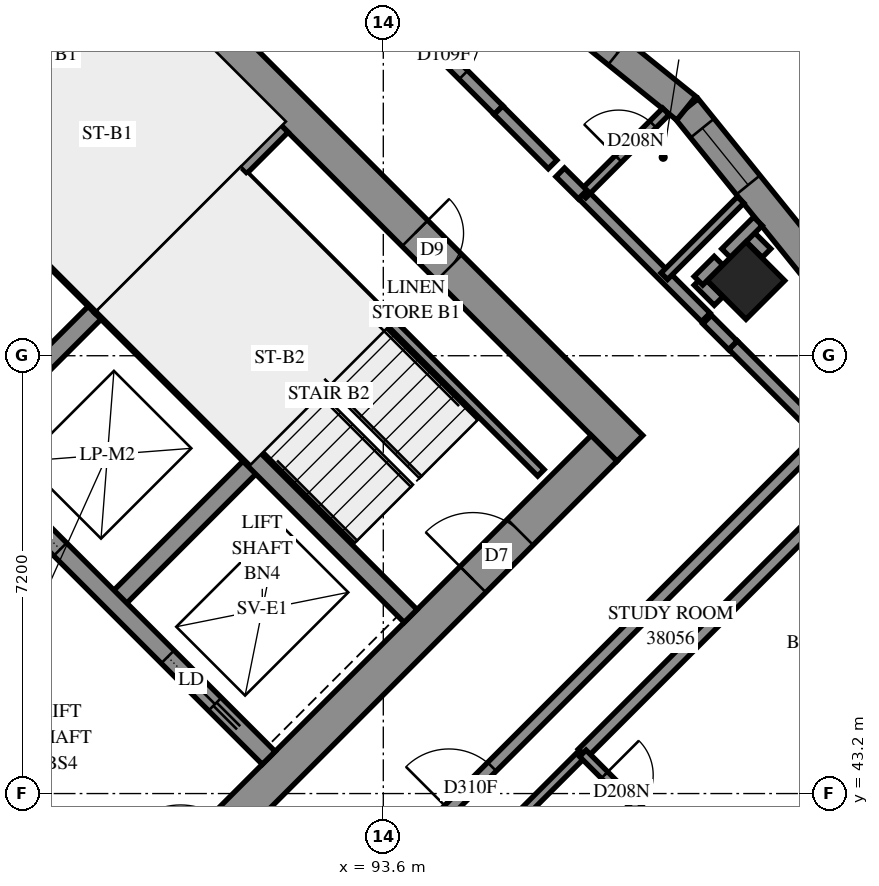
"""IFC4 building model, lengths in metres.
Left out: names, types, materials, properties, quantities, classifications, styles, units other than length and angle.
Written with IfcOpenShell. Run it as: python <this file> out.ifc"""

import sys

from ifc_helpers import new_model, si_unit, direction, frame, frame_2d, origin, origin_2d, place, context, subcontext, project, spatial, polyline, rectangle, outline, extrude, element, fill, save


model = new_model("IFC4")
c1 = context("Model", 3, precision=1e-05, world=origin(), true_north=direction((0.0, 1.0)))
c2 = subcontext(c1, "Body", "Model", "MODEL_VIEW")
j1 = project(units=[si_unit("LENGTHUNIT", "METRE"), si_unit("PLANEANGLEUNIT", "RADIAN")], contexts=[c1])
p1 = place(None, origin())
s1 = spatial("IfcSite", under=j1, at=p1, CompositionType="ELEMENT")
p2 = place(p1, origin())
s2 = spatial("IfcBuilding", under=s1, at=p2, CompositionType="ELEMENT")
p3 = place(p2, frame((0.0, 0.0, 142.2)))
s3 = spatial("IfcBuildingStorey", under=s2, at=p3, CompositionType="ELEMENT", Elevation=142.2)
p4 = place(p3, frame((99.565, 51.635, 0.0), z_axis=(0.0, 0.0, 1.0), x_axis=(0.7071067812, -0.7071067812, 0.0)))
e1 = element("IfcColumn", 1, at=p4, inside=s3, PredefinedType="COLUMN", context=c2, shape_type="SweptSolid", body=[
    extrude(rectangle(XDim=0.9, YDim=0.9, at=origin_2d()), origin(), (0.0, 0.0, 1.0), 3.1),
])
p5 = place(p3, frame((86.625, 59.908, -0.3), z_axis=(0.0, 0.0, 1.0), x_axis=(0.7071067812, -0.7071067812, 0.0)))
e2 = element("IfcWall", 2, at=p5, inside=s3, PredefinedType="SHEAR", context=c2, shape_type="SweptSolid", body=[
    extrude(rectangle(XDim=15.6, YDim=0.6, at=frame_2d((7.8, 0.0))), origin(), (0.0, 0.0, 1.0), 2.7),
])
p6 = place(p5, frame((10.6, 0.0, 0.3)))
e3 = element("IfcOpeningElement", 3, at=p6, cuts=e2, PredefinedType="OPENING", context=c2, shape_type="SweptSolid", body=[
    extrude(rectangle(XDim=0.8, YDim=2.1, at=frame_2d((0.4, 1.05))), frame((0.0, 0.31, 0.0), z_axis=(0.0, -1.0, 0.0), x_axis=(1.0, 0.0, 0.0)), (0.0, 0.0, 1.0), 0.62),
])
p7 = place(p3, frame((87.049, 38.695, -0.3), z_axis=(0.0, 0.0, 1.0), x_axis=(0.7071067812, 0.7071067812, 0.0)))
e4 = element("IfcWall", 4, at=p7, inside=s3, PredefinedType="SHEAR", context=c2, shape_type="SweptSolid", body=[
    extrude(rectangle(XDim=14.4, YDim=0.6, at=frame_2d((7.2, 0.0))), origin(), (0.0, 0.0, 1.0), 2.7),
])
p8 = place(p7, frame((4.55, 0.0, 0.3)))
e5 = element("IfcOpeningElement", 5, at=p8, cuts=e4, PredefinedType="OPENING", context=c2, shape_type="SweptSolid", body=[
    extrude(rectangle(XDim=1.1, YDim=2.1, at=frame_2d((0.55, 1.05))), frame((0.0, 0.31, 0.0), z_axis=(0.0, -1.0, 0.0), x_axis=(1.0, 0.0, 0.0)), (0.0, 0.0, 1.0), 0.62),
])
p9 = place(p7, frame((11.35, 0.0, 0.3)))
e6 = element("IfcOpeningElement", 6, at=p9, cuts=e4, PredefinedType="OPENING", context=c2, shape_type="SweptSolid", body=[
    extrude(rectangle(XDim=1.1, YDim=2.1, at=frame_2d((0.55, 1.05))), frame((0.0, 0.31, 0.0), z_axis=(0.0, -1.0, 0.0), x_axis=(1.0, 0.0, 0.0)), (0.0, 0.0, 1.0), 0.62),
])
for number, where, z_axis, x_axis in (
    (7, (86.625, 48.878, 0.0), (0.0, 0.0, 1.0), (0.707, 0.707, 0.0)),
    (8, (89.17, 46.332, 0.0), (0.0, 0.0, 1.0), (0.707, 0.707, 0.0)),
):
    element("IfcWall", number, at=place(p3, frame(where, z_axis=z_axis, x_axis=x_axis)), inside=s3, PredefinedType="SOLIDWALL", context=c2, shape_type="SweptSolid", body=[
        extrude(rectangle(XDim=3.3, YDim=0.3, at=frame_2d((1.65, 0.0))), origin(), (0.0, 0.0, 1.0), 3.1),
    ])
p10 = place(p3, frame((78.988, 51.423, 0.0), z_axis=(0.0, 0.0, 1.0), x_axis=(0.7071067812, -0.7071067812, 0.0)))
e9 = element("IfcWall", 9, at=p10, inside=s3, PredefinedType="SOLIDWALL", context=c2, shape_type="SweptSolid", body=[
    extrude(rectangle(XDim=14.4, YDim=0.3, at=frame_2d((7.2, 0.0))), origin(), (0.0, 0.0, 1.0), 3.1),
])
p11 = place(p10, frame((1.35, 0.0, 0.0)))
e10 = element("IfcOpeningElement", 10, at=p11, cuts=e9, PredefinedType="OPENING", context=c2, shape_type="SweptSolid", body=[
    extrude(rectangle(XDim=0.9, YDim=2.1, at=frame_2d((0.45, 1.05))), frame((0.0, 0.16, 0.0), z_axis=(0.0, -1.0, 0.0), x_axis=(1.0, 0.0, 0.0)), (0.0, 0.0, 1.0), 0.32),
])
p12 = place(p10, frame((4.95, 0.0, 0.0)))
e11 = element("IfcOpeningElement", 11, at=p12, cuts=e9, PredefinedType="OPENING", context=c2, shape_type="SweptSolid", body=[
    extrude(rectangle(XDim=0.9, YDim=2.1, at=frame_2d((0.45, 1.05))), frame((0.0, 0.16, 0.0), z_axis=(0.0, -1.0, 0.0), x_axis=(1.0, 0.0, 0.0)), (0.0, 0.0, 1.0), 0.32),
])
p13 = place(p10, frame((8.55, 0.0, 0.0)))
e12 = element("IfcOpeningElement", 12, at=p13, cuts=e9, PredefinedType="OPENING", context=c2, shape_type="SweptSolid", body=[
    extrude(rectangle(XDim=0.9, YDim=2.1, at=frame_2d((0.45, 1.05))), frame((0.0, 0.16, 0.0), z_axis=(0.0, -1.0, 0.0), x_axis=(1.0, 0.0, 0.0)), (0.0, 0.0, 1.0), 0.32),
])
p14 = place(p10, frame((12.05, 0.0, 0.0)))
e13 = element("IfcOpeningElement", 13, at=p14, cuts=e9, PredefinedType="OPENING", context=c2, shape_type="SweptSolid", body=[
    extrude(rectangle(XDim=1.1, YDim=2.1, at=frame_2d((0.55, 1.05))), frame((0.0, 0.16, 0.0), z_axis=(0.0, -1.0, 0.0), x_axis=(1.0, 0.0, 0.0)), (0.0, 0.0, 1.0), 0.32),
])
p15 = place(p3, frame((81.534, 53.969, 0.0), z_axis=(0.0, 0.0, 1.0), x_axis=(0.707103309, -0.7071102534, 0.0)))
e14 = element("IfcWall", 14, at=p15, inside=s3, PredefinedType="SOLIDWALL", context=c2, shape_type="SweptSolid", body=[
    extrude(rectangle(XDim=14.4, YDim=0.3, at=frame_2d((7.2, 0.0))), origin(), (0.0, 0.0, 1.0), 3.1),
])
p16 = place(p15, frame((1.25, 0.0, 0.0)))
e15 = element("IfcOpeningElement", 15, at=p16, cuts=e14, PredefinedType="OPENING", context=c2, shape_type="SweptSolid", body=[
    extrude(rectangle(XDim=1.1, YDim=2.1, at=frame_2d((0.55, 1.05))), frame((0.0, 0.16, 0.0), z_axis=(0.0, -1.0, 0.0), x_axis=(1.0, 0.0, 0.0)), (0.0, 0.0, 1.0), 0.32),
])
p17 = place(p15, frame((4.85, 0.0, 0.0)))
e16 = element("IfcOpeningElement", 16, at=p17, cuts=e14, PredefinedType="OPENING", context=c2, shape_type="SweptSolid", body=[
    extrude(rectangle(XDim=1.1, YDim=2.1, at=frame_2d((0.55, 1.05))), frame((0.0, 0.16, 0.0), z_axis=(0.0, -1.0, 0.0), x_axis=(1.0, 0.0, 0.0)), (0.0, 0.0, 1.0), 0.32),
])
p18 = place(p15, frame((8.45, 0.0, 0.0)))
e17 = element("IfcOpeningElement", 17, at=p18, cuts=e14, PredefinedType="OPENING", context=c2, shape_type="SweptSolid", body=[
    extrude(rectangle(XDim=1.1, YDim=2.1, at=frame_2d((0.55, 1.05))), frame((0.0, 0.16, 0.0), z_axis=(0.0, -1.0, 0.0), x_axis=(1.0, 0.0, 0.0)), (0.0, 0.0, 1.0), 0.32),
])
p19 = place(p15, frame((12.05, 0.0, 0.0)))
e18 = element("IfcOpeningElement", 18, at=p19, cuts=e14, PredefinedType="OPENING", context=c2, shape_type="SweptSolid", body=[
    extrude(rectangle(XDim=1.1, YDim=2.1, at=frame_2d((0.55, 1.05))), frame((0.0, 0.16, 0.0), z_axis=(0.0, -1.0, 0.0), x_axis=(1.0, 0.0, 0.0)), (0.0, 0.0, 1.0), 0.32),
])
for number, where, z_axis, x_axis in (
    (19, (83.867, 56.302, 0.0), (0.0, 0.0, 1.0), (0.707, -0.707, 0.0)),
    (20, (88.958, 51.211, 0.0), (0.0, 0.0, 1.0), (0.707, -0.707, 0.0)),
):
    element("IfcWall", number, at=place(p3, frame(where, z_axis=z_axis, x_axis=x_axis)), inside=s3, PredefinedType="SOLIDWALL", context=c2, shape_type="SweptSolid", body=[
        extrude(rectangle(XDim=7.2, YDim=0.3, at=frame_2d((3.6, 0.0))), origin(), (0.0, 0.0, 1.0), 3.1),
    ])
p20 = place(p3, frame((88.958, 51.211, 0.0), z_axis=(0.0, 0.0, 1.0), x_axis=(0.7071067812, 0.7071067812, 0.0)))
e21 = element("IfcWall", 21, at=p20, inside=s3, PredefinedType="SOLIDWALL", context=c2, shape_type="SweptSolid", body=[
    extrude(rectangle(XDim=4.2, YDim=0.3, at=frame_2d((2.1, 0.0))), origin(), (0.0, 0.0, 1.0), 3.1),
])
p21 = place(p3, frame((100.714, 51.828, 0.0), z_axis=(0.0, 0.0, 1.0), x_axis=(-0.6278699325, 0.7783182818, 0.0)))
e22 = element("IfcWall", 22, at=p21, inside=s3, PredefinedType="SOLIDWALL", context=c2, shape_type="SweptSolid", body=[
    extrude(outline(polyline([(0.027, -0.25), (3.421, -0.25), (3.367, 0.25), (-0.027, 0.25), (0.027, -0.25)])), origin(), (0.0, 0.0, 1.0), 3.1),
])
p22 = place(p21, frame((1.774, 0.0, 0.45)))
e23 = element("IfcOpeningElement", 23, at=p22, cuts=e22, PredefinedType="OPENING", context=c2, shape_type="SweptSolid", body=[
    extrude(rectangle(XDim=1.2, YDim=2.5, at=frame_2d((0.6, 1.25))), frame((0.0, 0.26, 0.0), z_axis=(0.0, -1.0, 0.0), x_axis=(1.0, 0.0, 0.0)), (0.0, 0.0, 1.0), 0.52),
])
p23 = place(p3, frame((98.583, 54.469, 0.0), z_axis=(0.0, 0.0, 1.0), x_axis=(-0.7783182818, 0.6278699325, 0.0)))
e24 = element("IfcWall", 24, at=p23, inside=s3, PredefinedType="SOLIDWALL", context=c2, shape_type="SweptSolid", body=[
    extrude(outline(polyline([(-0.027, -0.25), (3.367, -0.25), (3.421, 0.25), (0.027, 0.25), (-0.027, -0.25)])), origin(), (0.0, 0.0, 1.0), 3.1),
])
p24 = place(p23, frame((1.45, 0.0, 0.45)))
e25 = element("IfcOpeningElement", 25, at=p24, cuts=e24, PredefinedType="OPENING", context=c2, shape_type="SweptSolid", body=[
    extrude(rectangle(XDim=1.2, YDim=2.5, at=frame_2d((0.6, 1.25))), frame((0.0, 0.26, 0.0), z_axis=(0.0, -1.0, 0.0), x_axis=(1.0, 0.0, 0.0)), (0.0, 0.0, 1.0), 0.52),
])
p25 = place(p3, frame((91.313, 53.354, 0.0), z_axis=(0.0, 0.0, 1.0), x_axis=(0.7071140275, -0.7070995348, 0.0)))
e26 = element("IfcWall", 26, at=p25, inside=s3, PredefinedType="PARTITIONING", context=c2, shape_type="SweptSolid", body=[
    extrude(rectangle(XDim=6.9, YDim=0.15, at=frame_2d((3.45, 0.0))), origin(), (0.0, 0.0, 1.0), 3.1),
])
p26 = place(p3, frame((88.326, 61.609, 0.0), z_axis=(0.0, 0.0, 1.0), x_axis=(0.7071067812, -0.7071067812, 0.0)))
e27 = element("IfcWall", 27, at=p26, inside=s3, PredefinedType="PARTITIONING", context=c2, shape_type="SweptSolid", body=[
    extrude(rectangle(XDim=10.14, YDim=0.2, at=frame_2d((5.07, 0.0))), origin(), (0.0, 0.0, 1.0), 3.1),
])
p27 = place(p26, frame((8.422, 0.0, 0.0)))
e28 = element("IfcOpeningElement", 28, at=p27, cuts=e27, PredefinedType="OPENING", context=c2, shape_type="SweptSolid", body=[
    extrude(rectangle(XDim=0.9, YDim=2.1, at=frame_2d((0.45, 1.05))), frame((0.0, 0.11, 0.0), z_axis=(0.0, -1.0, 0.0), x_axis=(1.0, 0.0, 0.0)), (0.0, 0.0, 1.0), 0.22),
])
p28 = place(p3, frame((94.543, 42.797, 0.0), z_axis=(0.0, 0.0, 1.0), x_axis=(0.7071067812, 0.7071067812, 0.0)))
e29 = element("IfcWall", 29, at=p28, inside=s3, PredefinedType="PARTITIONING", context=c2, shape_type="SweptSolid", body=[
    extrude(rectangle(XDim=8.901, YDim=0.2, at=frame_2d((4.45, 0.0))), origin(), (0.0, 0.0, 1.0), 3.1),
])
p29 = place(p28, frame((0.193, 0.0, 0.0)))
e30 = element("IfcOpeningElement", 30, at=p29, cuts=e29, PredefinedType="OPENING", context=c2, shape_type="SweptSolid", body=[
    extrude(rectangle(XDim=1.0, YDim=2.1, at=frame_2d((0.5, 1.05))), frame((0.0, 0.11, 0.0), z_axis=(0.0, -1.0, 0.0), x_axis=(1.0, 0.0, 0.0)), (0.0, 0.0, 1.0), 0.22),
])
p30 = place(p3, frame((96.877, 43.859, 0.0), z_axis=(0.0, 0.0, 1.0), x_axis=(0.7071127272, 0.7071008351, 0.0)))
e31 = element("IfcWall", 31, at=p30, inside=s3, PredefinedType="PARTITIONING", context=c2, shape_type="SweptSolid", body=[
    extrude(rectangle(XDim=8.409, YDim=0.2, at=frame_2d((4.205, 0.0))), origin(), (0.0, 0.0, 1.0), 3.1),
])
p31 = place(p3, frame((100.013, 41.903, 0.0), z_axis=(0.0, 0.0, 1.0), x_axis=(0.7071067812, 0.7071067812, 0.0)))
e32 = element("IfcWall", 32, at=p31, inside=s3, PredefinedType="PARTITIONING", context=c2, shape_type="SweptSolid", body=[
    extrude(rectangle(XDim=5.928, YDim=0.2, at=frame_2d((2.964, 0.0))), origin(), (0.0, 0.0, 1.0), 3.1),
])
p32 = place(p3, frame((96.882, 53.053, 0.0), z_axis=(0.0, 0.0, 1.0), x_axis=(0.7071067812, -0.7071067812, 0.0)))
e33 = element("IfcWall", 33, at=p32, inside=s3, PredefinedType="PARTITIONING", context=c2, shape_type="SweptSolid", body=[
    extrude(rectangle(XDim=2.86, YDim=0.2, at=frame_2d((1.43, 0.0))), origin(), (0.0, 0.0, 1.0), 3.1),
])
p33 = place(p3, frame((95.179, 42.161, 0.0), z_axis=(0.0, 0.0, 1.0), x_axis=(0.7071067812, 0.7071067812, 0.0)))
e34 = element("IfcWall", 34, at=p33, inside=s3, PredefinedType="PARTITIONING", context=c2, shape_type="SweptSolid", body=[
    extrude(rectangle(XDim=2.401, YDim=0.15, at=frame_2d((1.201, 0.0))), origin(), (0.0, 0.0, 1.0), 3.1),
])
p34 = place(p3, frame((99.352, 50.574, 0.0), z_axis=(0.0, 0.0, 1.0), x_axis=(0.7075827869, -0.7066304548, 0.0)))
e35 = element("IfcWall", 35, at=p34, inside=s3, PredefinedType="PARTITIONING", context=c2, shape_type="SweptSolid", body=[
    extrude(rectangle(XDim=2.1, YDim=0.2, at=frame_2d((1.05, 0.0))), origin(), (0.0, 0.0, 1.0), 3.1),
])
p35 = place(p3, frame((96.881, 43.861, 0.0), z_axis=(0.0, 0.0, 1.0), x_axis=(0.7071067812, -0.7071067812, 0.0)))
e36 = element("IfcWall", 36, at=p35, inside=s3, PredefinedType="PARTITIONING", context=c2, shape_type="SweptSolid", body=[
    extrude(rectangle(XDim=1.901, YDim=0.15, at=frame_2d((0.95, 0.0))), origin(), (0.0, 0.0, 1.0), 3.1),
])
p36 = place(p35, frame((0.505, 0.0, 0.0)))
e37 = element("IfcOpeningElement", 37, at=p36, cuts=e36, PredefinedType="OPENING", context=c2, shape_type="SweptSolid", body=[
    extrude(rectangle(XDim=0.8, YDim=2.1, at=frame_2d((0.4, 1.05))), frame((0.0, 0.085, 0.0), z_axis=(0.0, -1.0, 0.0), x_axis=(1.0, 0.0, 0.0)), (0.0, 0.0, 1.0), 0.17),
])
p37 = place(p3, frame((96.878, 53.05, 0.0), z_axis=(0.0, 0.0, 1.0), x_axis=(0.7076230681, 0.7065901171, 0.0)))
e38 = element("IfcWall", 38, at=p37, inside=s3, PredefinedType="PARTITIONING", context=c2, shape_type="SweptSolid", body=[
    extrude(rectangle(XDim=1.936, YDim=0.15, at=frame_2d((0.968, 0.0))), origin(), (0.0, 0.0, 1.0), 3.1),
])
p38 = place(p37, frame((0.834, 0.0, 0.0)))
e39 = element("IfcOpeningElement", 39, at=p38, cuts=e38, PredefinedType="OPENING", context=c2, shape_type="SweptSolid", body=[
    extrude(rectangle(XDim=0.8, YDim=2.1, at=frame_2d((0.4, 1.05))), frame((0.0, 0.085, 0.0), z_axis=(0.0, -1.0, 0.0), x_axis=(1.0, 0.0, 0.0)), (0.0, 0.0, 1.0), 0.17),
])
p39 = place(p3, frame((98.221, 51.707, 0.0), z_axis=(0.0, 0.0, 1.0), x_axis=(0.7071349331, 0.7070786281, 0.0)))
e40 = element("IfcWall", 40, at=p39, inside=s3, PredefinedType="PARTITIONING", context=c2, shape_type="SweptSolid", body=[
    extrude(rectangle(XDim=1.776, YDim=0.15, at=frame_2d((0.888, 0.0))), origin(), (0.0, 0.0, 1.0), 3.1),
])
p40 = place(p3, frame((95.494, 54.438, 0.0), z_axis=(0.0, 0.0, 1.0), x_axis=(0.706312726, -0.7078999456, 0.0)))
e41 = element("IfcWall", 41, at=p40, inside=s3, PredefinedType="PARTITIONING", context=c2, shape_type="SweptSolid", body=[
    extrude(rectangle(XDim=1.26, YDim=0.2, at=frame_2d((0.63, 0.0))), origin(), (0.0, 0.0, 1.0), 3.1),
])
p41 = place(p3, frame((98.925, 50.995, 0.0), z_axis=(0.0, 0.0, 1.0), x_axis=(0.7071067812, -0.7071067812, 0.0)))
e42 = element("IfcWall", 42, at=p41, inside=s3, PredefinedType="PARTITIONING", context=c2, shape_type="SweptSolid", body=[
    extrude(rectangle(XDim=0.6, YDim=0.2, at=frame_2d((0.3, 0.0))), origin(), (0.0, 0.0, 1.0), 3.1),
])
p42 = place(p3, frame((96.51, 53.416, 0.0), z_axis=(0.0, 0.0, 1.0), x_axis=(0.7090308706, -0.7051774419, 0.0)))
e43 = element("IfcWall", 43, at=p42, inside=s3, PredefinedType="PARTITIONING", context=c2, shape_type="SweptSolid", body=[
    extrude(rectangle(XDim=0.519, YDim=0.2, at=frame_2d((0.26, 0.0))), origin(), (0.0, 0.0, 1.0), 3.1),
])
for number, where, z_axis, x_axis in (
    (44, (99.57, 52.418, 0.0), (0.0, 0.0, 1.0), (0.709, -0.705, 0.0)),
    (45, (98.784, 51.632, 0.0), (0.0, 0.0, 1.0), (0.705, -0.709, 0.0)),
):
    element("IfcWall", number, at=place(p3, frame(where, z_axis=z_axis, x_axis=x_axis)), inside=s3, PredefinedType="PARTITIONING", context=c2, shape_type="SweptSolid", body=[
        extrude(rectangle(XDim=0.468, YDim=0.2, at=frame_2d((0.234, 0.0))), origin(), (0.0, 0.0, 1.0), 3.1),
    ])
p43 = place(p3, frame((98.783, 51.633, 0.0), z_axis=(0.0, 0.0, 1.0), x_axis=(0.7071067812, 0.7071067812, 0.0)))
e46 = element("IfcWall", 46, at=p43, inside=s3, PredefinedType="PARTITIONING", context=c2, shape_type="SweptSolid", body=[
    extrude(rectangle(XDim=0.467, YDim=0.2, at=frame_2d((0.233, 0.0))), origin(), (0.0, 0.0, 1.0), 3.1),
])
p44 = place(p3, frame((99.237, 52.087, 0.0), z_axis=(0.0, 0.0, 1.0), x_axis=(0.7071742693, 0.7070392866, 0.0)))
e47 = element("IfcWall", 47, at=p44, inside=s3, PredefinedType="PARTITIONING", context=c2, shape_type="SweptSolid", body=[
    extrude(rectangle(XDim=0.741, YDim=0.2, at=frame_2d((0.37, 0.0))), origin(), (0.0, 0.0, 1.0), 3.1),
])
p45 = place(p22, origin())
e48 = element("IfcWindow", 48, at=p45, inside=s3, PartitioningType="SINGLE_PANEL", PredefinedType="WINDOW", context=c2, shape_type="SweptSolid", body=[
    extrude(rectangle(XDim=1.2, YDim=2.5, at=frame_2d((0.6, 1.25))), frame((0.0, 0.18, 0.0), z_axis=(0.0, -1.0, 0.0), x_axis=(1.0, 0.0, 0.0)), (0.0, 0.0, 1.0), 0.06),
])
fill(e23, e48)
p46 = place(p24, origin())
e49 = element("IfcWindow", 49, at=p46, inside=s3, PartitioningType="SINGLE_PANEL", PredefinedType="WINDOW", context=c2, shape_type="SweptSolid", body=[
    extrude(rectangle(XDim=1.2, YDim=2.5, at=frame_2d((0.6, 1.25))), frame((0.0, 0.18, 0.0), z_axis=(0.0, -1.0, 0.0), x_axis=(1.0, 0.0, 0.0)), (0.0, 0.0, 1.0), 0.06),
])
fill(e25, e49)
p47 = place(p6, origin())
e50 = element("IfcDoor", 50, at=p47, inside=s3, OperationType="SINGLE_SWING_RIGHT", PredefinedType="DOOR", context=c2, shape_type="SweptSolid", body=[
    extrude(rectangle(XDim=0.8, YDim=2.1, at=frame_2d((0.4, 1.05))), frame((0.0, 0.025, 0.0), z_axis=(0.0, -1.0, 0.0), x_axis=(1.0, 0.0, 0.0)), (0.0, 0.0, 1.0), 0.05),
])
fill(e3, e50)
p48 = place(p9, origin())
e51 = element("IfcDoor", 51, at=p48, inside=s3, OperationType="SINGLE_SWING_RIGHT", PredefinedType="DOOR", context=c2, shape_type="SweptSolid", body=[
    extrude(rectangle(XDim=1.1, YDim=2.1, at=frame_2d((0.55, 1.05))), frame((0.0, 0.025, 0.0), z_axis=(0.0, -1.0, 0.0), x_axis=(1.0, 0.0, 0.0)), (0.0, 0.0, 1.0), 0.05),
])
fill(e6, e51)
p49 = place(p18, origin())
e52 = element("IfcDoor", 52, at=p49, inside=s3, OperationType="SLIDING_TO_LEFT", PredefinedType="DOOR", context=c2, shape_type="SweptSolid", body=[
    extrude(rectangle(XDim=1.1, YDim=2.1, at=frame_2d((0.55, 1.05))), frame((0.0, 0.025, 0.0), z_axis=(0.0, -1.0, 0.0), x_axis=(1.0, 0.0, 0.0)), (0.0, 0.0, 1.0), 0.05),
])
fill(e17, e52)
p50 = place(p19, origin())
e53 = element("IfcDoor", 53, at=p50, inside=s3, OperationType="SLIDING_TO_RIGHT", PredefinedType="DOOR", context=c2, shape_type="SweptSolid", body=[
    extrude(rectangle(XDim=1.1, YDim=2.1, at=frame_2d((0.55, 1.05))), frame((0.0, 0.025, 0.0), z_axis=(0.0, -1.0, 0.0), x_axis=(1.0, 0.0, 0.0)), (0.0, 0.0, 1.0), 0.05),
])
fill(e18, e53)
p51 = place(p27, origin())
e54 = element("IfcDoor", 54, at=p51, inside=s3, OperationType="SINGLE_SWING_LEFT", PredefinedType="DOOR", context=c2, shape_type="SweptSolid", body=[
    extrude(rectangle(XDim=0.9, YDim=2.1, at=frame_2d((0.45, 1.05))), frame((0.0, 0.025, 0.0), z_axis=(0.0, -1.0, 0.0), x_axis=(1.0, 0.0, 0.0)), (0.0, 0.0, 1.0), 0.05),
])
fill(e28, e54)
p52 = place(p38, origin())
e55 = element("IfcDoor", 55, at=p52, inside=s3, OperationType="SINGLE_SWING_RIGHT", PredefinedType="DOOR", context=c2, shape_type="SweptSolid", body=[
    extrude(rectangle(XDim=0.8, YDim=2.1, at=frame_2d((0.4, 1.05))), frame((0.0, 0.025, 0.0), z_axis=(0.0, -1.0, 0.0), x_axis=(1.0, 0.0, 0.0)), (0.0, 0.0, 1.0), 0.05),
])
fill(e39, e55)
p53 = place(p29, origin())
e56 = element("IfcDoor", 56, at=p53, inside=s3, OperationType="SINGLE_SWING_LEFT", PredefinedType="DOOR", context=c2, shape_type="SweptSolid", body=[
    extrude(rectangle(XDim=1.0, YDim=2.1, at=frame_2d((0.5, 1.05))), frame((0.0, 0.025, 0.0), z_axis=(0.0, -1.0, 0.0), x_axis=(1.0, 0.0, 0.0)), (0.0, 0.0, 1.0), 0.05),
])
fill(e30, e56)
p54 = place(p36, origin())
e57 = element("IfcDoor", 57, at=p54, inside=s3, OperationType="SINGLE_SWING_RIGHT", PredefinedType="DOOR", context=c2, shape_type="SweptSolid", body=[
    extrude(rectangle(XDim=0.8, YDim=2.1, at=frame_2d((0.4, 1.05))), frame((0.0, 0.025, 0.0), z_axis=(0.0, -1.0, 0.0), x_axis=(1.0, 0.0, 0.0)), (0.0, 0.0, 1.0), 0.05),
])
fill(e37, e57)
save(model, sys.argv[1])
